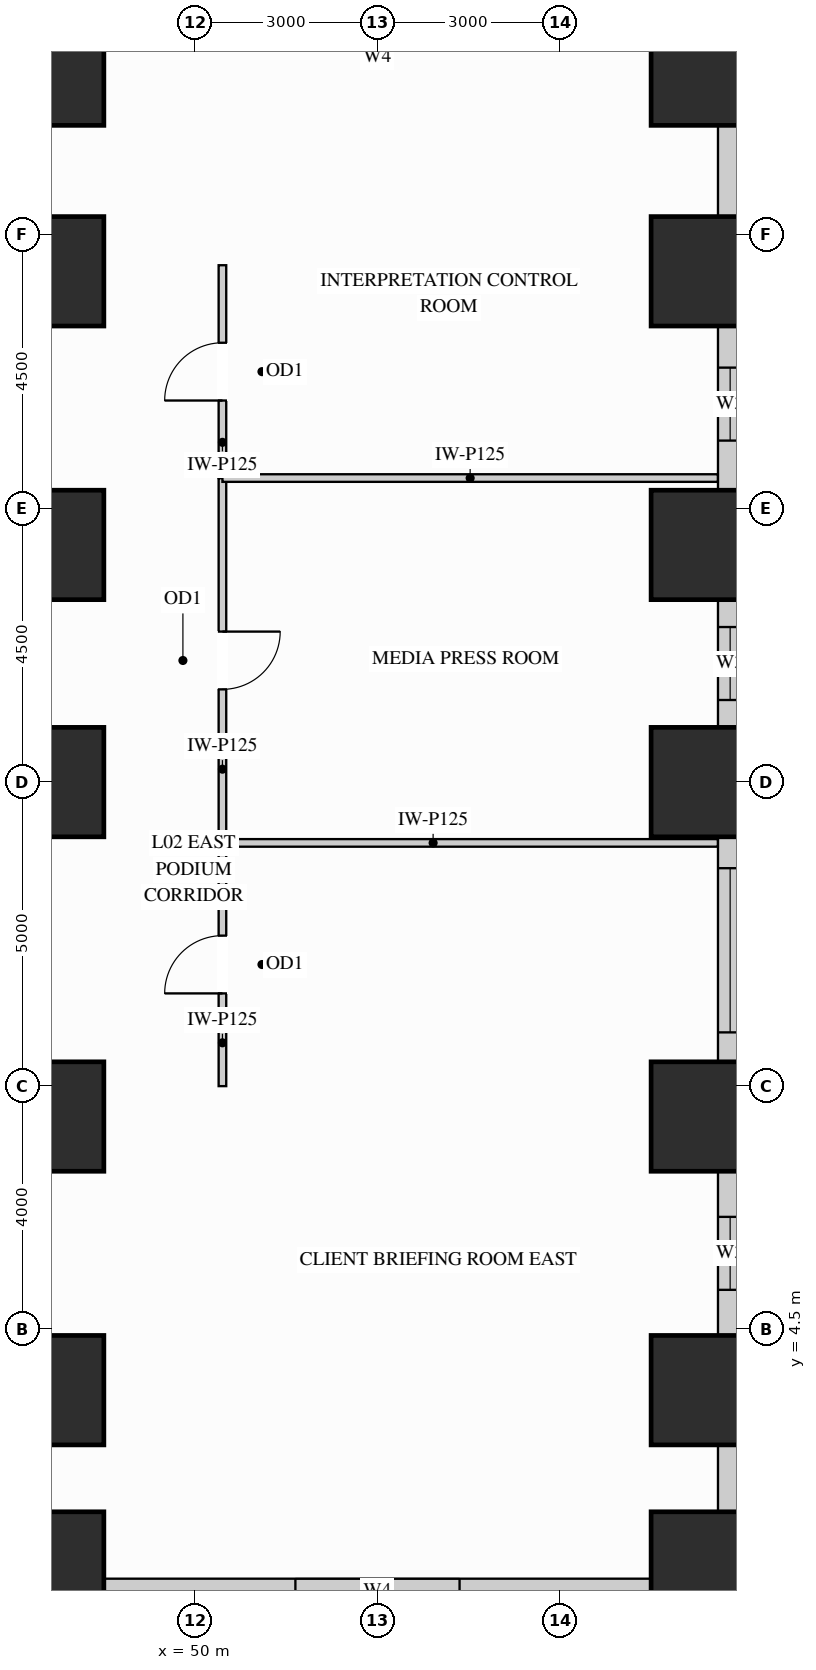
"""IFC4 building model, lengths in metres.
Left out: names, types, materials, properties, quantities, classifications, styles, units other than length and angle.
Written with IfcOpenShell. Run it as: python <this file> out.ifc"""

import sys

from ifc_helpers import new_model, si_unit, direction, frame, frame_2d, origin, origin_2d, place, context, subcontext, project, spatial, rectangle, extrude, source, transform, mapped, element, fill, save


model = new_model("IFC4")
c1 = context("Model", 3, precision=1e-05, world=origin(), true_north=direction((0.0, 1.0)))
c2 = subcontext(c1, "Body", "Model", "MODEL_VIEW")
j1 = project(units=[si_unit("LENGTHUNIT", "METRE"), si_unit("PLANEANGLEUNIT", "RADIAN")], contexts=[c1])
p1 = place(None, origin())
s1 = spatial("IfcSite", under=j1, at=p1, CompositionType="ELEMENT")
p2 = place(p1, origin())
s2 = spatial("IfcBuilding", under=s1, at=p2, CompositionType="ELEMENT")
p3 = place(p2, frame((0.0, 0.0, 9.0)))
s3 = spatial("IfcBuildingStorey", under=s2, at=p3, CompositionType="ELEMENT", Elevation=9.0)
m1 = source(origin(), c2, "Body", "SweptSolid", [
    extrude(rectangle(XDim=1.8, YDim=1.8, at=origin_2d()), origin(), (0.0, 0.0, 1.0), 4.25),
])
for number, where, z_axis, x_axis in (
    (1, (47.6, 0.6, 0.0), (0.0, 0.0, 1.0), (1.0, 0.0, 0.0)),
    (2, (58.4, 0.6, 0.0), (0.0, 0.0, 1.0), (1.0, 0.0, 0.0)),
    (3, (58.4, 3.5, 0.0), (0.0, 0.0, 1.0), (1.0, 0.0, 0.0)),
    (4, (58.4, 8.0, 0.0), (0.0, 0.0, 1.0), (1.0, 0.0, 0.0)),
    (5, (58.4, 13.5, 0.0), (0.0, 0.0, 1.0), (1.0, 0.0, 0.0)),
    (6, (58.4, 17.4, 0.0), (0.0, 0.0, 1.0), (1.0, 0.0, 0.0)),
    (7, (58.4, 21.9, 0.0), (0.0, 0.0, 1.0), (1.0, 0.0, 0.0)),
    (8, (58.4, 25.2, 0.0), (0.0, 0.0, 1.0), (1.0, 0.0, 0.0)),
    (9, (47.6, 3.5, 0.0), (0.0, 0.0, 1.0), (1.0, 0.0, 0.0)),
    (10, (47.6, 8.0, 0.0), (0.0, 0.0, 1.0), (1.0, 0.0, 0.0)),
    (11, (47.6, 13.5, 0.0), (0.0, 0.0, 1.0), (1.0, 0.0, 0.0)),
    (12, (47.6, 17.4, 0.0), (0.0, 0.0, 1.0), (1.0, 0.0, 0.0)),
    (13, (47.6, 21.9, 0.0), (0.0, 0.0, 1.0), (1.0, 0.0, 0.0)),
    (14, (47.6, 25.2, 0.0), (0.0, 0.0, 1.0), (1.0, 0.0, 0.0)),
):
    element("IfcColumn", number, at=place(p3, frame(where, z_axis=z_axis, x_axis=x_axis)), inside=s3, PredefinedType="COLUMN", context=c2, shape_type="MappedRepresentation", body=[
        mapped(m1, transform((0.0, 0.0, 0.0), x_axis=(1.0, 0.0, 0.0), y_axis=(0.0, 1.0, 0.0), z_axis=(0.0, 0.0, 1.0))),
    ])
p4 = place(p3, frame((48.498, 0.2, 0.0), z_axis=(0.0, 0.0, 1.0), x_axis=(1.0, 0.0, 0.0)))
e15 = element("IfcWall", 15, at=p4, inside=s3, PredefinedType="SOLIDWALL", context=c2, shape_type="SweptSolid", body=[
    extrude(rectangle(XDim=9.004, YDim=0.4, at=frame_2d((4.502, 0.0))), origin(), (0.0, 0.0, 1.0), 3.117),
])
p5 = place(p4, frame((3.152, 0.0, 0.65)))
e16 = element("IfcOpeningElement", 16, at=p5, cuts=e15, PredefinedType="OPENING", context=c2, shape_type="SweptSolid", body=[
    extrude(rectangle(XDim=2.7, YDim=2.287, at=frame_2d((1.35, 1.144))), frame((0.0, 0.21, 0.0), z_axis=(0.0, -1.0, 0.0), x_axis=(1.0, 0.0, 0.0)), (0.0, 0.0, 1.0), 0.42),
])
m2 = source(origin(), c2, "Body", "SweptSolid", [
    extrude(rectangle(XDim=1.104, YDim=0.4, at=frame_2d((0.552, 0.0))), origin(), (0.0, 0.0, 1.0), 3.117),
])
p6 = place(p3, frame((58.8, 1.498, 0.0), z_axis=(0.0, 0.0, 1.0), x_axis=(0.0, 1.0, 0.0)))
e17 = element("IfcWall", 17, at=p6, inside=s3, PredefinedType="SOLIDWALL", context=c2, shape_type="MappedRepresentation", body=[
    mapped(m2, transform((0.0, 0.0, 0.0), x_axis=(1.0, 0.0, 0.0), y_axis=(0.0, 1.0, 0.0), z_axis=(0.0, 0.0, 1.0))),
])
p7 = place(p3, frame((58.8, 4.398, 0.0), z_axis=(0.0, 0.0, 1.0), x_axis=(0.0, 1.0, 0.0)))
e18 = element("IfcWall", 18, at=p7, inside=s3, PredefinedType="SOLIDWALL", context=c2, shape_type="SweptSolid", body=[
    extrude(rectangle(XDim=2.704, YDim=0.4, at=frame_2d((1.352, 0.0))), origin(), (0.0, 0.0, 1.0), 3.117),
])
p8 = place(p7, frame((0.752, 0.0, 0.65)))
e19 = element("IfcOpeningElement", 19, at=p8, cuts=e18, PredefinedType="OPENING", context=c2, shape_type="SweptSolid", body=[
    extrude(rectangle(XDim=1.2, YDim=2.287, at=frame_2d((0.6, 1.144))), frame((0.0, 0.21, 0.0), z_axis=(0.0, -1.0, 0.0), x_axis=(1.0, 0.0, 0.0)), (0.0, 0.0, 1.0), 0.42),
])
p9 = place(p3, frame((58.8, 8.898, 0.0), z_axis=(0.0, 0.0, 1.0), x_axis=(0.0, 1.0, 0.0)))
e20 = element("IfcWall", 20, at=p9, inside=s3, PredefinedType="SOLIDWALL", context=c2, shape_type="SweptSolid", body=[
    extrude(rectangle(XDim=3.704, YDim=0.4, at=frame_2d((1.852, 0.0))), origin(), (0.0, 0.0, 1.0), 3.117),
])
p10 = place(p9, frame((0.486, 0.0, 0.65)))
e21 = element("IfcOpeningElement", 21, at=p10, cuts=e20, PredefinedType="OPENING", context=c2, shape_type="SweptSolid", body=[
    extrude(rectangle(XDim=2.7, YDim=2.287, at=frame_2d((1.35, 1.144))), frame((0.0, 0.21, 0.0), z_axis=(0.0, -1.0, 0.0), x_axis=(1.0, 0.0, 0.0)), (0.0, 0.0, 1.0), 0.42),
])
p11 = place(p3, frame((58.8, 14.398, 0.0), z_axis=(0.0, 0.0, 1.0), x_axis=(0.0, 1.0, 0.0)))
e22 = element("IfcWall", 22, at=p11, inside=s3, PredefinedType="SOLIDWALL", context=c2, shape_type="SweptSolid", body=[
    extrude(rectangle(XDim=2.104, YDim=0.4, at=frame_2d((1.052, 0.0))), origin(), (0.0, 0.0, 1.0), 3.117),
])
p12 = place(p11, frame((0.452, 0.0, 0.65)))
e23 = element("IfcOpeningElement", 23, at=p12, cuts=e22, PredefinedType="OPENING", context=c2, shape_type="SweptSolid", body=[
    extrude(rectangle(XDim=1.2, YDim=2.287, at=frame_2d((0.6, 1.144))), frame((0.0, 0.21, 0.0), z_axis=(0.0, -1.0, 0.0), x_axis=(1.0, 0.0, 0.0)), (0.0, 0.0, 1.0), 0.42),
])
p13 = place(p3, frame((58.8, 18.298, 0.0), z_axis=(0.0, 0.0, 1.0), x_axis=(0.0, 1.0, 0.0)))
e24 = element("IfcWall", 24, at=p13, inside=s3, PredefinedType="SOLIDWALL", context=c2, shape_type="SweptSolid", body=[
    extrude(rectangle(XDim=2.704, YDim=0.4, at=frame_2d((1.352, 0.0))), origin(), (0.0, 0.0, 1.0), 3.117),
])
p14 = place(p13, frame((0.818, 0.0, 0.65)))
e25 = element("IfcOpeningElement", 25, at=p14, cuts=e24, PredefinedType="OPENING", context=c2, shape_type="SweptSolid", body=[
    extrude(rectangle(XDim=1.2, YDim=2.287, at=frame_2d((0.6, 1.144))), frame((0.0, 0.21, 0.0), z_axis=(0.0, -1.0, 0.0), x_axis=(1.0, 0.0, 0.0)), (0.0, 0.0, 1.0), 0.42),
])
m3 = source(origin(), c2, "Body", "SweptSolid", [
    extrude(rectangle(XDim=1.504, YDim=0.4, at=frame_2d((0.752, 0.0))), origin(), (0.0, 0.0, 1.0), 3.117),
])
p15 = place(p3, frame((58.8, 22.798, 0.0), z_axis=(0.0, 0.0, 1.0), x_axis=(0.0, 1.0, 0.0)))
e26 = element("IfcWall", 26, at=p15, inside=s3, PredefinedType="SOLIDWALL", context=c2, shape_type="MappedRepresentation", body=[
    mapped(m3, transform((0.0, 0.0, 0.0), x_axis=(1.0, 0.0, 0.0), y_axis=(0.0, 1.0, 0.0), z_axis=(0.0, 0.0, 1.0))),
])
p16 = place(p3, frame((50.45, 8.5, 0.0), z_axis=(0.0, 0.0, 1.0), x_axis=(0.0, 1.0, 0.0)))
e27 = element("IfcWall", 27, at=p16, inside=s3, PredefinedType="PARTITIONING", context=c2, shape_type="SweptSolid", body=[
    extrude(rectangle(XDim=4.0, YDim=0.125, at=frame_2d((2.0, 0.0))), origin(), (0.0, 0.0, 1.0), 4.235),
])
p17 = place(p16, frame((1.525, 0.0, 0.0)))
e28 = element("IfcOpeningElement", 28, at=p17, cuts=e27, PredefinedType="OPENING", context=c2, shape_type="SweptSolid", body=[
    extrude(rectangle(XDim=0.95, YDim=2.15, at=frame_2d((0.475, 1.075))), frame((0.0, 0.073, 0.0), z_axis=(0.0, -1.0, 0.0), x_axis=(1.0, 0.0, 0.0)), (0.0, 0.0, 1.0), 0.145),
])
p18 = place(p3, frame((50.45, 12.5, 0.0), z_axis=(0.0, 0.0, 1.0), x_axis=(0.0, 1.0, 0.0)))
e29 = element("IfcWall", 29, at=p18, inside=s3, PredefinedType="PARTITIONING", context=c2, shape_type="SweptSolid", body=[
    extrude(rectangle(XDim=6.0, YDim=0.125, at=frame_2d((3.0, 0.0))), origin(), (0.0, 0.0, 1.0), 4.235),
])
p19 = place(p18, frame((2.525, 0.0, 0.0)))
e30 = element("IfcOpeningElement", 30, at=p19, cuts=e29, PredefinedType="OPENING", context=c2, shape_type="SweptSolid", body=[
    extrude(rectangle(XDim=0.95, YDim=2.15, at=frame_2d((0.475, 1.075))), frame((0.0, 0.073, 0.0), z_axis=(0.0, -1.0, 0.0), x_axis=(1.0, 0.0, 0.0)), (0.0, 0.0, 1.0), 0.145),
])
p20 = place(p3, frame((50.45, 18.5, 0.0), z_axis=(0.0, 0.0, 1.0), x_axis=(0.0, 1.0, 0.0)))
e31 = element("IfcWall", 31, at=p20, inside=s3, PredefinedType="PARTITIONING", context=c2, shape_type="SweptSolid", body=[
    extrude(rectangle(XDim=3.5, YDim=0.125, at=frame_2d((1.75, 0.0))), origin(), (0.0, 0.0, 1.0), 4.235),
])
p21 = place(p20, frame((1.275, 0.0, 0.0)))
e32 = element("IfcOpeningElement", 32, at=p21, cuts=e31, PredefinedType="OPENING", context=c2, shape_type="SweptSolid", body=[
    extrude(rectangle(XDim=0.95, YDim=2.15, at=frame_2d((0.475, 1.075))), frame((0.0, 0.073, 0.0), z_axis=(0.0, -1.0, 0.0), x_axis=(1.0, 0.0, 0.0)), (0.0, 0.0, 1.0), 0.145),
])
m4 = source(origin(), c2, "Body", "SweptSolid", [
    extrude(rectangle(XDim=8.148, YDim=0.125, at=frame_2d((4.074, 0.0))), origin(), (0.0, 0.0, 1.0), 4.235),
])
for number, where, z_axis, x_axis in (
    (33, (50.45, 12.5, 0.0), (0.0, 0.0, 1.0), (1.0, 0.0, 0.0)),
    (34, (50.45, 18.5, 0.0), (0.0, 0.0, 1.0), (1.0, 0.0, 0.0)),
):
    element("IfcWall", number, at=place(p3, frame(where, z_axis=z_axis, x_axis=x_axis)), inside=s3, PredefinedType="PARTITIONING", context=c2, shape_type="MappedRepresentation", body=[
        mapped(m4, transform((0.0, 0.0, 0.0), x_axis=(1.0, 0.0, 0.0), y_axis=(0.0, 1.0, 0.0), z_axis=(0.0, 0.0, 1.0))),
    ])
m5 = source(origin(), c2, "Body", "SweptSolid", [
    extrude(rectangle(XDim=0.95, YDim=2.15, at=frame_2d((0.475, 1.075))), frame((0.0, 0.025, 0.0), z_axis=(0.0, -1.0, 0.0), x_axis=(1.0, 0.0, 0.0)), (0.0, 0.0, 1.0), 0.05),
])
p22 = place(p17, origin())
e35 = element("IfcDoor", 35, at=p22, inside=s3, OperationType="SINGLE_SWING_LEFT", PredefinedType="DOOR", context=c2, shape_type="MappedRepresentation", body=[
    mapped(m5, transform((0.0, 0.0, 0.0), x_axis=(1.0, 0.0, 0.0), y_axis=(0.0, 1.0, 0.0), z_axis=(0.0, 0.0, 1.0))),
])
fill(e28, e35)
p23 = place(p19, origin())
e36 = element("IfcDoor", 36, at=p23, inside=s3, OperationType="SINGLE_SWING_RIGHT", PredefinedType="DOOR", context=c2, shape_type="MappedRepresentation", body=[
    mapped(m5, transform((0.0, 0.0, 0.0), x_axis=(1.0, 0.0, 0.0), y_axis=(0.0, 1.0, 0.0), z_axis=(0.0, 0.0, 1.0))),
])
fill(e30, e36)
p24 = place(p21, origin())
e37 = element("IfcDoor", 37, at=p24, inside=s3, OperationType="SINGLE_SWING_LEFT", PredefinedType="DOOR", context=c2, shape_type="MappedRepresentation", body=[
    mapped(m5, transform((0.0, 0.0, 0.0), x_axis=(1.0, 0.0, 0.0), y_axis=(0.0, 1.0, 0.0), z_axis=(0.0, 0.0, 1.0))),
])
fill(e32, e37)
m6 = source(origin(), c2, "Body", "SweptSolid", [
    extrude(rectangle(XDim=1.2, YDim=2.287, at=frame_2d((0.6, 1.144))), frame((0.0, 0.03, 0.0), z_axis=(0.0, -1.0, 0.0), x_axis=(1.0, 0.0, 0.0)), (0.0, 0.0, 1.0), 0.06),
])
p25 = place(p8, origin())
e38 = element("IfcWindow", 38, at=p25, inside=s3, PartitioningType="SINGLE_PANEL", PredefinedType="WINDOW", context=c2, shape_type="MappedRepresentation", body=[
    mapped(m6, transform((0.0, 0.0, 0.0), x_axis=(1.0, 0.0, 0.0), y_axis=(0.0, 1.0, 0.0), z_axis=(0.0, 0.0, 1.0))),
])
fill(e19, e38)
p26 = place(p12, origin())
e39 = element("IfcWindow", 39, at=p26, inside=s3, PartitioningType="SINGLE_PANEL", PredefinedType="WINDOW", context=c2, shape_type="MappedRepresentation", body=[
    mapped(m6, transform((0.0, 0.0, 0.0), x_axis=(1.0, 0.0, 0.0), y_axis=(0.0, 1.0, 0.0), z_axis=(0.0, 0.0, 1.0))),
])
fill(e23, e39)
p27 = place(p14, origin())
e40 = element("IfcWindow", 40, at=p27, inside=s3, PartitioningType="SINGLE_PANEL", PredefinedType="WINDOW", context=c2, shape_type="MappedRepresentation", body=[
    mapped(m6, transform((0.0, 0.0, 0.0), x_axis=(1.0, 0.0, 0.0), y_axis=(0.0, 1.0, 0.0), z_axis=(0.0, 0.0, 1.0))),
])
fill(e25, e40)
m7 = source(origin(), c2, "Body", "SweptSolid", [
    extrude(rectangle(XDim=2.7, YDim=2.287, at=frame_2d((1.35, 1.144))), frame((0.0, 0.03, 0.0), z_axis=(0.0, -1.0, 0.0), x_axis=(1.0, 0.0, 0.0)), (0.0, 0.0, 1.0), 0.06),
])
p28 = place(p5, origin())
e41 = element("IfcWindow", 41, at=p28, inside=s3, PartitioningType="SINGLE_PANEL", PredefinedType="WINDOW", context=c2, shape_type="MappedRepresentation", body=[
    mapped(m7, transform((0.0, 0.0, 0.0), x_axis=(1.0, 0.0, 0.0), y_axis=(0.0, 1.0, 0.0), z_axis=(0.0, 0.0, 1.0))),
])
fill(e16, e41)
p29 = place(p10, origin())
e42 = element("IfcWindow", 42, at=p29, inside=s3, PartitioningType="SINGLE_PANEL", PredefinedType="WINDOW", context=c2, shape_type="MappedRepresentation", body=[
    mapped(m7, transform((0.0, 0.0, 0.0), x_axis=(1.0, 0.0, 0.0), y_axis=(0.0, 1.0, 0.0), z_axis=(0.0, 0.0, 1.0))),
])
fill(e21, e42)
save(model, sys.argv[1])
